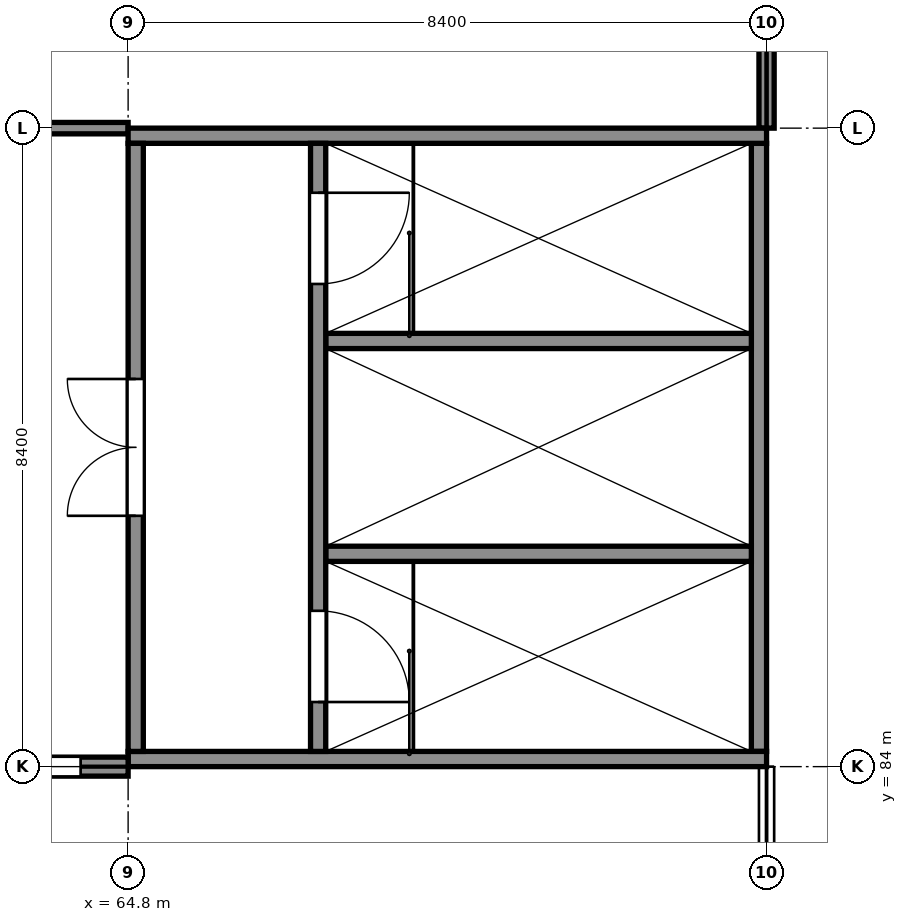
"""IFC4 building model, lengths in metres.
Left out: names, types, materials, properties, quantities, classifications, styles, units other than length and angle.
Written with IfcOpenShell. Run it as: python <this file> out.ifc"""

import sys

from ifc_helpers import new_model, si_unit, direction, frame, frame_2d, origin, place, context, subcontext, project, spatial, polyline, rectangle, outline, extrude, element, fill, save


model = new_model("IFC4")
c1 = context("Model", 3, precision=1e-05, world=origin(), true_north=direction((0.0, 1.0)))
c2 = subcontext(c1, "Body", "Model", "MODEL_VIEW")
j1 = project(units=[si_unit("LENGTHUNIT", "METRE"), si_unit("PLANEANGLEUNIT", "RADIAN")], contexts=[c1])
p1 = place(None, origin())
s1 = spatial("IfcSite", under=j1, at=p1, CompositionType="ELEMENT")
p2 = place(p1, origin())
s2 = spatial("IfcBuilding", under=s1, at=p2, CompositionType="ELEMENT")
p3 = place(p2, frame((0.0, 0.0, 20.0)))
s3 = spatial("IfcBuildingStorey", under=s2, at=p3, CompositionType="ELEMENT", Elevation=20.0)
p4 = place(p3, frame((64.8, 84.1, 0.0), z_axis=(0.0, 0.0, 1.0), x_axis=(1.0, 0.0, 0.0)))
e1 = element("IfcWall", 1, at=p4, inside=s3, PredefinedType="SHEAR", context=c2, shape_type="SweptSolid", body=[
    extrude(rectangle(XDim=8.4, YDim=0.2, at=frame_2d((4.2, 0.0))), origin(), (0.0, 0.0, 1.0), 10.375),
])
p5 = place(p3, frame((64.8, 92.3, 0.0), z_axis=(0.0, 0.0, 1.0), x_axis=(1.0, 0.0, 0.0)))
e2 = element("IfcWall", 2, at=p5, inside=s3, PredefinedType="SHEAR", context=c2, shape_type="SweptSolid", body=[
    extrude(rectangle(XDim=8.4, YDim=0.2, at=frame_2d((4.2, 0.0))), origin(), (0.0, 0.0, 1.0), 8.425),
])
p6 = place(p3, frame((64.9, 84.2, 0.0), z_axis=(0.0, 0.0, 1.0), x_axis=(0.0, 1.0, 0.0)))
e3 = element("IfcWall", 3, at=p6, inside=s3, PredefinedType="SHEAR", context=c2, shape_type="SweptSolid", body=[
    extrude(outline(polyline([(0.0, 0.0), (8.0, 0.0), (8.0, 8.448), (7.704, 8.518), (7.407, 8.589), (7.111, 8.659), (6.815, 8.73), (6.519, 8.8), (6.222, 8.871), (5.926, 8.941), (5.333, 9.083), (5.037, 9.153), (4.741, 9.224), (4.444, 9.294), (4.148, 9.365), (3.852, 9.435), (3.556, 9.506), (3.259, 9.576), (2.963, 9.647), (2.667, 9.717), (2.074, 9.859), (1.778, 9.929), (1.481, 10.0), (1.185, 10.07), (0.889, 10.141), (0.593, 10.211), (0.296, 10.282), (0.0, 10.352), (0.0, 0.0)])), frame((0.0, 0.1, 0.0), z_axis=(0.0, -1.0, 0.0), x_axis=(1.0, 0.0, 0.0)), (0.0, 0.0, 1.0), 0.2),
])
p7 = place(p6, frame((3.1, 0.0, 0.0)))
e4 = element("IfcOpeningElement", 4, at=p7, cuts=e3, PredefinedType="OPENING", context=c2, shape_type="SweptSolid", body=[
    extrude(rectangle(XDim=1.8, YDim=2.1, at=frame_2d((0.9, 1.05))), frame((0.0, 0.11, 0.0), z_axis=(0.0, -1.0, 0.0), x_axis=(1.0, 0.0, 0.0)), (0.0, 0.0, 1.0), 0.22),
])
p8 = place(p3, frame((73.1, 84.2, 0.0), z_axis=(0.0, 0.0, 1.0), x_axis=(0.0, 1.0, 0.0)))
e5 = element("IfcWall", 5, at=p8, inside=s3, PredefinedType="SHEAR", context=c2, shape_type="SweptSolid", body=[
    extrude(rectangle(XDim=8.0, YDim=0.2, at=frame_2d((4.0, 0.0))), origin(), (0.0, 0.0, 1.0), 10.4),
])
p9 = place(p3, frame((67.3, 84.2, 0.0), z_axis=(0.0, 0.0, 1.0), x_axis=(0.0, 1.0, 0.0)))
e6 = element("IfcWall", 6, at=p9, inside=s3, PredefinedType="SHEAR", context=c2, shape_type="SweptSolid", body=[
    extrude(outline(polyline([(0.0, 0.0), (8.0, 0.0), (8.0, 8.448), (7.704, 8.518), (7.407, 8.589), (7.111, 8.659), (6.815, 8.73), (6.519, 8.8), (6.222, 8.871), (5.926, 8.941), (5.333, 9.083), (5.037, 9.153), (4.741, 9.224), (4.444, 9.294), (4.148, 9.365), (3.852, 9.435), (3.556, 9.506), (3.259, 9.576), (2.963, 9.647), (2.667, 9.717), (2.074, 9.859), (1.778, 9.929), (1.481, 10.0), (1.185, 10.07), (0.889, 10.141), (0.593, 10.211), (0.296, 10.282), (0.0, 10.352), (0.0, 0.0)])), frame((0.0, 0.1, 0.0), z_axis=(0.0, -1.0, 0.0), x_axis=(1.0, 0.0, 0.0)), (0.0, 0.0, 1.0), 0.2),
])
p10 = place(p9, frame((0.65, 0.0, 0.0)))
e7 = element("IfcOpeningElement", 7, at=p10, cuts=e6, PredefinedType="OPENING", context=c2, shape_type="SweptSolid", body=[
    extrude(rectangle(XDim=1.2, YDim=2.1, at=frame_2d((0.6, 1.05))), frame((0.0, 0.11, 0.0), z_axis=(0.0, -1.0, 0.0), x_axis=(1.0, 0.0, 0.0)), (0.0, 0.0, 1.0), 0.22),
])
p11 = place(p9, frame((6.15, 0.0, 0.0)))
e8 = element("IfcOpeningElement", 8, at=p11, cuts=e6, PredefinedType="OPENING", context=c2, shape_type="SweptSolid", body=[
    extrude(rectangle(XDim=1.2, YDim=2.1, at=frame_2d((0.6, 1.05))), frame((0.0, 0.11, 0.0), z_axis=(0.0, -1.0, 0.0), x_axis=(1.0, 0.0, 0.0)), (0.0, 0.0, 1.0), 0.22),
])
p12 = place(p3, frame((67.4, 86.8, 0.0), z_axis=(0.0, 0.0, 1.0), x_axis=(1.0, 0.0, 0.0)))
e9 = element("IfcWall", 9, at=p12, inside=s3, PredefinedType="SHEAR", context=c2, shape_type="SweptSolid", body=[
    extrude(rectangle(XDim=5.6, YDim=0.2, at=frame_2d((2.8, 0.0))), origin(), (0.0, 0.0, 1.0), 9.732),
])
p13 = place(p3, frame((67.4, 89.6, 0.0), z_axis=(0.0, 0.0, 1.0), x_axis=(1.0, 0.0, 0.0)))
e10 = element("IfcWall", 10, at=p13, inside=s3, PredefinedType="SHEAR", context=c2, shape_type="SweptSolid", body=[
    extrude(rectangle(XDim=5.6, YDim=0.2, at=frame_2d((2.8, 0.0))), origin(), (0.0, 0.0, 1.0), 9.067),
])
p14 = place(p3, frame((56.75, 84.0, 0.0), z_axis=(0.0, 0.0, 1.0), x_axis=(1.0, 0.0, 0.0)))
e11 = element("IfcWall", 11, at=p14, inside=s3, PredefinedType="SOLIDWALL", context=c2, shape_type="SweptSolid", body=[
    extrude(rectangle(XDim=8.05, YDim=0.25, at=frame_2d((4.025, 0.0))), origin(), (0.0, 0.0, 1.0), 10.349),
])
p15 = place(p14, frame((0.625, 0.0, 0.9)))
e12 = element("IfcOpeningElement", 12, at=p15, cuts=e11, PredefinedType="OPENING", context=c2, shape_type="SweptSolid", body=[
    extrude(rectangle(XDim=1.2, YDim=2.1, at=frame_2d((0.6, 1.05))), frame((0.0, 0.135, 0.0), z_axis=(0.0, -1.0, 0.0), x_axis=(1.0, 0.0, 0.0)), (0.0, 0.0, 1.0), 0.27),
])
p16 = place(p14, frame((3.425, 0.0, 0.9)))
e13 = element("IfcOpeningElement", 13, at=p16, cuts=e11, PredefinedType="OPENING", context=c2, shape_type="SweptSolid", body=[
    extrude(rectangle(XDim=1.2, YDim=2.1, at=frame_2d((0.6, 1.05))), frame((0.0, 0.135, 0.0), z_axis=(0.0, -1.0, 0.0), x_axis=(1.0, 0.0, 0.0)), (0.0, 0.0, 1.0), 0.27),
])
p17 = place(p14, frame((6.225, 0.0, 0.9)))
e14 = element("IfcOpeningElement", 14, at=p17, cuts=e11, PredefinedType="OPENING", context=c2, shape_type="SweptSolid", body=[
    extrude(rectangle(XDim=1.2, YDim=2.1, at=frame_2d((0.6, 1.05))), frame((0.0, 0.135, 0.0), z_axis=(0.0, -1.0, 0.0), x_axis=(1.0, 0.0, 0.0)), (0.0, 0.0, 1.0), 0.27),
])
p18 = place(p3, frame((56.75, 92.4, 0.0), z_axis=(0.0, 0.0, 1.0), x_axis=(1.0, 0.0, 0.0)))
e15 = element("IfcWall", 15, at=p18, inside=s3, PredefinedType="PARTITIONING", context=c2, shape_type="SweptSolid", body=[
    extrude(rectangle(XDim=8.05, YDim=0.15, at=frame_2d((4.025, 0.0))), origin(), (0.0, 0.0, 1.0), 7.9),
])
p19 = place(p3, frame((73.2, 92.4, 0.0), z_axis=(0.0, 0.0, 1.0), x_axis=(0.0, 1.0, 0.0)))
e16 = element("IfcWall", 16, at=p19, inside=s3, PredefinedType="PARTITIONING", context=c2, shape_type="SweptSolid", body=[
    extrude(rectangle(XDim=8.4, YDim=0.2, at=frame_2d((4.2, 0.0))), origin(), (0.0, 0.0, 1.0), 3.9),
])
p20 = place(p17, origin())
e17 = element("IfcWindow", 17, at=p20, inside=s3, PartitioningType="SINGLE_PANEL", PredefinedType="WINDOW", context=c2, shape_type="SweptSolid", body=[
    extrude(rectangle(XDim=1.2, YDim=2.1, at=frame_2d((0.6, 1.05))), frame((0.0, 0.105, 0.0), z_axis=(0.0, -1.0, 0.0), x_axis=(1.0, 0.0, 0.0)), (0.0, 0.0, 1.0), 0.06),
])
fill(e14, e17)
p21 = place(p7, origin())
e18 = element("IfcDoor", 18, at=p21, inside=s3, OperationType="DOUBLE_DOOR_SINGLE_SWING", PredefinedType="DOOR", context=c2, shape_type="SweptSolid", body=[
    extrude(rectangle(XDim=1.8, YDim=2.1, at=frame_2d((0.9, 1.05))), frame((0.0, 0.025, 0.0), z_axis=(0.0, -1.0, 0.0), x_axis=(1.0, 0.0, 0.0)), (0.0, 0.0, 1.0), 0.05),
])
fill(e4, e18)
p22 = place(p10, origin())
e19 = element("IfcDoor", 19, at=p22, inside=s3, OperationType="SINGLE_SWING_LEFT", PredefinedType="DOOR", context=c2, shape_type="SweptSolid", body=[
    extrude(rectangle(XDim=1.2, YDim=2.1, at=frame_2d((0.6, 1.05))), frame((0.0, 0.025, 0.0), z_axis=(0.0, -1.0, 0.0), x_axis=(1.0, 0.0, 0.0)), (0.0, 0.0, 1.0), 0.05),
])
fill(e7, e19)
p23 = place(p11, origin())
e20 = element("IfcDoor", 20, at=p23, inside=s3, OperationType="SINGLE_SWING_RIGHT", PredefinedType="DOOR", context=c2, shape_type="SweptSolid", body=[
    extrude(rectangle(XDim=1.2, YDim=2.1, at=frame_2d((0.6, 1.05))), frame((0.0, 0.025, 0.0), z_axis=(0.0, -1.0, 0.0), x_axis=(1.0, 0.0, 0.0)), (0.0, 0.0, 1.0), 0.05),
])
fill(e8, e20)
save(model, sys.argv[1])
